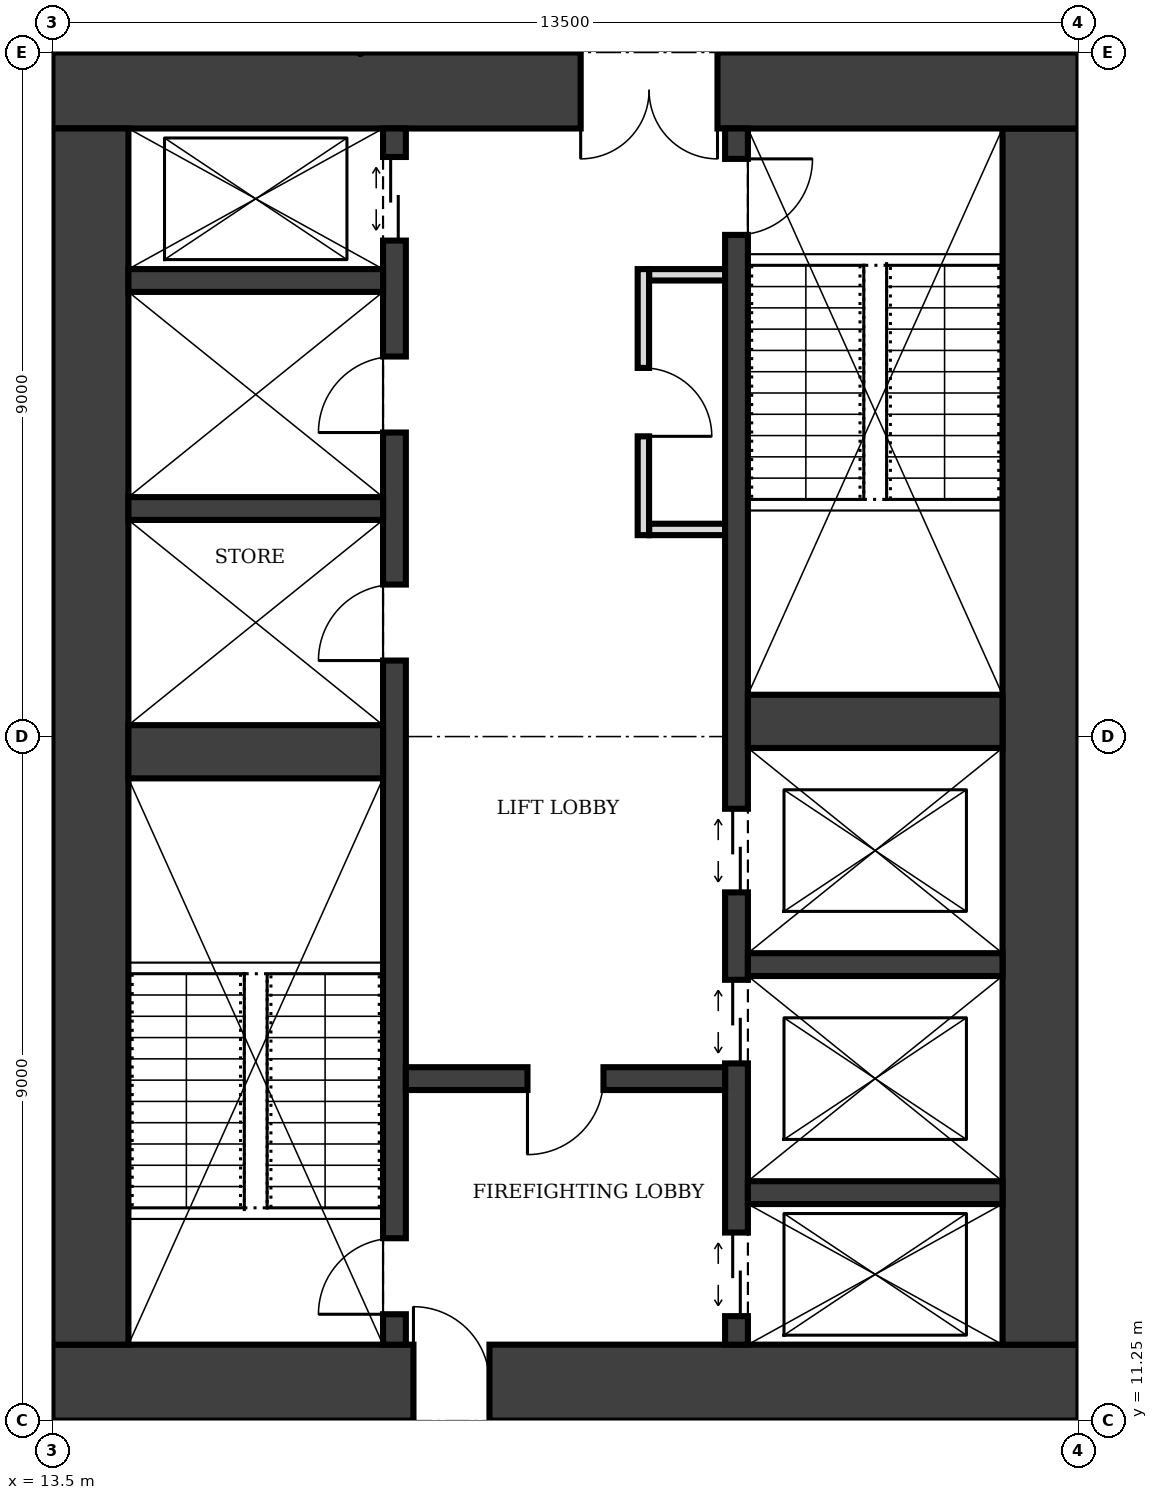
"""IFC4 building model, lengths in metres.
Left out: names, types, materials, properties, quantities, classifications, styles, units other than length and angle.
Written with IfcOpenShell. Run it as: python <this file> out.ifc"""

import sys

from ifc_helpers import new_model, si_unit, direction, frame, frame_2d, origin, place, context, subcontext, project, spatial, rectangle, extrude, element, fill, save


model = new_model("IFC4")
c1 = context("Model", 3, precision=1e-05, world=origin(), true_north=direction((0.0, 1.0)))
c2 = subcontext(c1, "Body", "Model", "MODEL_VIEW")
j1 = project(units=[si_unit("LENGTHUNIT", "METRE"), si_unit("PLANEANGLEUNIT", "RADIAN")], contexts=[c1])
p1 = place(None, origin())
s1 = spatial("IfcSite", under=j1, at=p1, CompositionType="ELEMENT")
p2 = place(p1, origin())
s2 = spatial("IfcBuilding", under=s1, at=p2, CompositionType="ELEMENT")
p3 = place(p2, frame((0.0, 0.0, 257.0)))
s3 = spatial("IfcBuildingStorey", under=s2, at=p3, CompositionType="ELEMENT", Elevation=257.0)
p4 = place(p3, frame((13.5, 11.75, 0.0), z_axis=(0.0, 0.0, 1.0), x_axis=(1.0, 0.0, 0.0)))
e1 = element("IfcWall", 1, at=p4, inside=s3, PredefinedType="SHEAR", context=c2, shape_type="SweptSolid", body=[
    extrude(rectangle(XDim=13.5, YDim=1.0, at=frame_2d((6.75, 0.0))), origin(), (0.0, 0.0, 1.0), 4.0),
])
p5 = place(p4, frame((4.75, 0.0, 0.0)))
e2 = element("IfcOpeningElement", 2, at=p5, cuts=e1, PredefinedType="OPENING", context=c2, shape_type="SweptSolid", body=[
    extrude(rectangle(XDim=1.0, YDim=2.1, at=frame_2d((0.5, 1.05))), frame((0.0, 0.51, 0.0), z_axis=(0.0, -1.0, 0.0), x_axis=(1.0, 0.0, 0.0)), (0.0, 0.0, 1.0), 1.02),
])
p6 = place(p3, frame((26.5, 12.25, 0.0), z_axis=(0.0, 0.0, 1.0), x_axis=(0.0, 1.0, 0.0)))
e3 = element("IfcWall", 3, at=p6, inside=s3, PredefinedType="SHEAR", context=c2, shape_type="SweptSolid", body=[
    extrude(rectangle(XDim=16.0, YDim=1.0, at=frame_2d((8.0, 0.0))), origin(), (0.0, 0.0, 1.0), 4.0),
])
p7 = place(p3, frame((27.0, 28.75, 0.0), z_axis=(0.0, 0.0, 1.0), x_axis=(-1.0, 0.0, 0.0)))
e4 = element("IfcWall", 4, at=p7, inside=s3, PredefinedType="SHEAR", context=c2, shape_type="SweptSolid", body=[
    extrude(rectangle(XDim=13.5, YDim=1.0, at=frame_2d((6.75, 0.0))), origin(), (0.0, 0.0, 1.0), 4.0),
])
p8 = place(p7, frame((4.75, 0.0, 0.0)))
e5 = element("IfcOpeningElement", 5, at=p8, cuts=e4, PredefinedType="OPENING", context=c2, shape_type="SweptSolid", body=[
    extrude(rectangle(XDim=1.8, YDim=2.1, at=frame_2d((0.9, 1.05))), frame((0.0, 0.51, 0.0), z_axis=(0.0, -1.0, 0.0), x_axis=(1.0, 0.0, 0.0)), (0.0, 0.0, 1.0), 1.02),
])
p9 = place(p3, frame((14.0, 28.25, 0.0), z_axis=(0.0, 0.0, 1.0), x_axis=(0.0, -1.0, 0.0)))
e6 = element("IfcWall", 6, at=p9, inside=s3, PredefinedType="SHEAR", context=c2, shape_type="SweptSolid", body=[
    extrude(rectangle(XDim=16.0, YDim=1.0, at=frame_2d((8.0, 0.0))), origin(), (0.0, 0.0, 1.0), 4.0),
])
p10 = place(p3, frame((18.0, 12.25, 0.0), z_axis=(0.0, 0.0, 1.0), x_axis=(0.0, 1.0, 0.0)))
e7 = element("IfcWall", 7, at=p10, inside=s3, PredefinedType="SHEAR", context=c2, shape_type="SweptSolid", body=[
    extrude(rectangle(XDim=16.0, YDim=0.3, at=frame_2d((8.0, 0.0))), origin(), (0.0, 0.0, 1.0), 4.0),
])
p11 = place(p10, frame((0.4, 0.0, 0.0)))
e8 = element("IfcOpeningElement", 8, at=p11, cuts=e7, PredefinedType="OPENING", context=c2, shape_type="SweptSolid", body=[
    extrude(rectangle(XDim=1.0, YDim=2.1, at=frame_2d((0.5, 1.05))), frame((0.0, 0.16, 0.0), z_axis=(0.0, -1.0, 0.0), x_axis=(1.0, 0.0, 0.0)), (0.0, 0.0, 1.0), 0.32),
])
p12 = place(p10, frame((14.525, 0.0, 0.0)))
e9 = element("IfcOpeningElement", 9, at=p12, cuts=e7, PredefinedType="OPENING", context=c2, shape_type="SweptSolid", body=[
    extrude(rectangle(XDim=1.1, YDim=2.1, at=frame_2d((0.55, 1.05))), frame((0.0, 0.16, 0.0), z_axis=(0.0, -1.0, 0.0), x_axis=(1.0, 0.0, 0.0)), (0.0, 0.0, 1.0), 0.32),
])
p13 = place(p10, frame((9.0, 0.0, 0.0)))
e10 = element("IfcOpeningElement", 10, at=p13, cuts=e7, PredefinedType="OPENING", context=c2, shape_type="SweptSolid", body=[
    extrude(rectangle(XDim=1.0, YDim=2.1, at=frame_2d((0.5, 1.05))), frame((0.0, 0.16, 0.0), z_axis=(0.0, -1.0, 0.0), x_axis=(1.0, 0.0, 0.0)), (0.0, 0.0, 1.0), 0.32),
])
p14 = place(p10, frame((12.0, 0.0, 0.0)))
e11 = element("IfcOpeningElement", 11, at=p14, cuts=e7, PredefinedType="OPENING", context=c2, shape_type="SweptSolid", body=[
    extrude(rectangle(XDim=1.0, YDim=2.1, at=frame_2d((0.5, 1.05))), frame((0.0, 0.16, 0.0), z_axis=(0.0, -1.0, 0.0), x_axis=(1.0, 0.0, 0.0)), (0.0, 0.0, 1.0), 0.32),
])
p15 = place(p3, frame((22.5, 12.25, 0.0), z_axis=(0.0, 0.0, 1.0), x_axis=(0.0, 1.0, 0.0)))
e12 = element("IfcWall", 12, at=p15, inside=s3, PredefinedType="SHEAR", context=c2, shape_type="SweptSolid", body=[
    extrude(rectangle(XDim=16.0, YDim=0.3, at=frame_2d((8.0, 0.0))), origin(), (0.0, 0.0, 1.0), 4.0),
])
p16 = place(p15, frame((14.6, 0.0, 0.0)))
e13 = element("IfcOpeningElement", 13, at=p16, cuts=e12, PredefinedType="OPENING", context=c2, shape_type="SweptSolid", body=[
    extrude(rectangle(XDim=1.0, YDim=2.1, at=frame_2d((0.5, 1.05))), frame((0.0, 0.16, 0.0), z_axis=(0.0, -1.0, 0.0), x_axis=(1.0, 0.0, 0.0)), (0.0, 0.0, 1.0), 0.32),
])
p17 = place(p15, frame((0.375, 0.0, 0.0)))
e14 = element("IfcOpeningElement", 14, at=p17, cuts=e12, PredefinedType="OPENING", context=c2, shape_type="SweptSolid", body=[
    extrude(rectangle(XDim=1.1, YDim=2.1, at=frame_2d((0.55, 1.05))), frame((0.0, 0.16, 0.0), z_axis=(0.0, -1.0, 0.0), x_axis=(1.0, 0.0, 0.0)), (0.0, 0.0, 1.0), 0.32),
])
p18 = place(p15, frame((3.7, 0.0, 0.0)))
e15 = element("IfcOpeningElement", 15, at=p18, cuts=e12, PredefinedType="OPENING", context=c2, shape_type="SweptSolid", body=[
    extrude(rectangle(XDim=1.1, YDim=2.1, at=frame_2d((0.55, 1.05))), frame((0.0, 0.16, 0.0), z_axis=(0.0, -1.0, 0.0), x_axis=(1.0, 0.0, 0.0)), (0.0, 0.0, 1.0), 0.32),
])
p19 = place(p15, frame((5.95, 0.0, 0.0)))
e16 = element("IfcOpeningElement", 16, at=p19, cuts=e12, PredefinedType="OPENING", context=c2, shape_type="SweptSolid", body=[
    extrude(rectangle(XDim=1.1, YDim=2.1, at=frame_2d((0.55, 1.05))), frame((0.0, 0.16, 0.0), z_axis=(0.0, -1.0, 0.0), x_axis=(1.0, 0.0, 0.0)), (0.0, 0.0, 1.0), 0.32),
])
p20 = place(p3, frame((14.5, 20.05, 0.0), z_axis=(0.0, 0.0, 1.0), x_axis=(1.0, 0.0, 0.0)))
e17 = element("IfcWall", 17, at=p20, inside=s3, PredefinedType="SHEAR", context=c2, shape_type="SweptSolid", body=[
    extrude(rectangle(XDim=3.35, YDim=0.7, at=frame_2d((1.675, 0.0))), origin(), (0.0, 0.0, 1.0), 4.0),
])
p21 = place(p3, frame((18.15, 15.75, 0.0), z_axis=(0.0, 0.0, 1.0), x_axis=(1.0, 0.0, 0.0)))
e18 = element("IfcWall", 18, at=p21, inside=s3, PredefinedType="SHEAR", context=c2, shape_type="SweptSolid", body=[
    extrude(rectangle(XDim=4.2, YDim=0.3, at=frame_2d((2.1, 0.0))), origin(), (0.0, 0.0, 1.0), 4.0),
])
p22 = place(p21, frame((1.6, 0.0, 0.0)))
e19 = element("IfcOpeningElement", 19, at=p22, cuts=e18, PredefinedType="OPENING", context=c2, shape_type="SweptSolid", body=[
    extrude(rectangle(XDim=1.0, YDim=2.1, at=frame_2d((0.5, 1.05))), frame((0.0, 0.16, 0.0), z_axis=(0.0, -1.0, 0.0), x_axis=(1.0, 0.0, 0.0)), (0.0, 0.0, 1.0), 0.32),
])
for number, where, z_axis, x_axis in (
    (20, (22.65, 14.25, 0.0), (0.0, 0.0, 1.0), (1.0, 0.0, 0.0)),
    (21, (22.65, 17.25, 0.0), (0.0, 0.0, 1.0), (1.0, 0.0, 0.0)),
):
    element("IfcWall", number, at=place(p3, frame(where, z_axis=z_axis, x_axis=x_axis)), inside=s3, PredefinedType="SHEAR", context=c2, shape_type="SweptSolid", body=[
        extrude(rectangle(XDim=3.35, YDim=0.3, at=frame_2d((1.675, 0.0))), origin(), (0.0, 0.0, 1.0), 4.0),
    ])
p23 = place(p3, frame((22.65, 20.45, 0.0), z_axis=(0.0, 0.0, 1.0), x_axis=(1.0, 0.0, 0.0)))
e22 = element("IfcWall", 22, at=p23, inside=s3, PredefinedType="SHEAR", context=c2, shape_type="SweptSolid", body=[
    extrude(rectangle(XDim=3.35, YDim=0.7, at=frame_2d((1.675, 0.0))), origin(), (0.0, 0.0, 1.0), 4.0),
])
for number, where, z_axis, x_axis in (
    (23, (14.5, 23.25, 0.0), (0.0, 0.0, 1.0), (1.0, 0.0, 0.0)),
    (24, (14.5, 26.25, 0.0), (0.0, 0.0, 1.0), (1.0, 0.0, 0.0)),
):
    element("IfcWall", number, at=place(p3, frame(where, z_axis=z_axis, x_axis=x_axis)), inside=s3, PredefinedType="SHEAR", context=c2, shape_type="SweptSolid", body=[
        extrude(rectangle(XDim=3.35, YDim=0.3, at=frame_2d((1.675, 0.0))), origin(), (0.0, 0.0, 1.0), 4.0),
    ])
p24 = place(p3, frame((21.275, 22.9, 0.0), z_axis=(0.0, 0.0, 1.0), x_axis=(0.0, 1.0, 0.0)))
e25 = element("IfcWall", 25, at=p24, inside=s3, PredefinedType="PARTITIONING", context=c2, shape_type="SweptSolid", body=[
    extrude(rectangle(XDim=3.5, YDim=0.15, at=frame_2d((1.75, 0.0))), origin(), (0.0, 0.0, 1.0), 3.75),
])
p25 = place(p24, frame((1.3, 0.0, 0.0)))
e26 = element("IfcOpeningElement", 26, at=p25, cuts=e25, PredefinedType="OPENING", context=c2, shape_type="SweptSolid", body=[
    extrude(rectangle(XDim=0.9, YDim=2.1, at=frame_2d((0.45, 1.05))), frame((0.0, 0.085, 0.0), z_axis=(0.0, -1.0, 0.0), x_axis=(1.0, 0.0, 0.0)), (0.0, 0.0, 1.0), 0.17),
])
for number, where, z_axis, x_axis in (
    (27, (21.35, 22.975, 0.0), (0.0, 0.0, 1.0), (1.0, 0.0, 0.0)),
    (28, (21.35, 26.325, 0.0), (0.0, 0.0, 1.0), (1.0, 0.0, 0.0)),
):
    element("IfcWall", number, at=place(p3, frame(where, z_axis=z_axis, x_axis=x_axis)), inside=s3, PredefinedType="PARTITIONING", context=c2, shape_type="SweptSolid", body=[
        extrude(rectangle(XDim=1.0, YDim=0.15, at=frame_2d((0.5, 0.0))), origin(), (0.0, 0.0, 1.0), 3.75),
    ])
p26 = place(p5, origin())
e29 = element("IfcDoor", 29, at=p26, inside=s3, OperationType="SINGLE_SWING_LEFT", PredefinedType="DOOR", context=c2, shape_type="SweptSolid", body=[
    extrude(rectangle(XDim=1.0, YDim=2.1, at=frame_2d((0.5, 1.05))), frame((0.0, 0.025, 0.0), z_axis=(0.0, -1.0, 0.0), x_axis=(1.0, 0.0, 0.0)), (0.0, 0.0, 1.0), 0.05),
])
fill(e2, e29)
p27 = place(p8, origin())
e30 = element("IfcDoor", 30, at=p27, inside=s3, OperationType="DOUBLE_DOOR_SINGLE_SWING", PredefinedType="DOOR", context=c2, shape_type="SweptSolid", body=[
    extrude(rectangle(XDim=1.8, YDim=2.1, at=frame_2d((0.9, 1.05))), frame((0.0, 0.025, 0.0), z_axis=(0.0, -1.0, 0.0), x_axis=(1.0, 0.0, 0.0)), (0.0, 0.0, 1.0), 0.05),
])
fill(e5, e30)
p28 = place(p22, frame((1.0, 0.0, 0.0), z_axis=(0.0, 0.0, 1.0), x_axis=(-1.0, 0.0, 0.0)))
e31 = element("IfcDoor", 31, at=p28, inside=s3, OperationType="SINGLE_SWING_RIGHT", PredefinedType="DOOR", context=c2, shape_type="SweptSolid", body=[
    extrude(rectangle(XDim=1.0, YDim=2.1, at=frame_2d((0.5, 1.05))), frame((0.0, 0.025, 0.0), z_axis=(0.0, -1.0, 0.0), x_axis=(1.0, 0.0, 0.0)), (0.0, 0.0, 1.0), 0.05),
])
fill(e19, e31)
p29 = place(p11, origin())
e32 = element("IfcDoor", 32, at=p29, inside=s3, OperationType="SINGLE_SWING_LEFT", PredefinedType="DOOR", context=c2, shape_type="SweptSolid", body=[
    extrude(rectangle(XDim=1.0, YDim=2.1, at=frame_2d((0.5, 1.05))), frame((0.0, 0.025, 0.0), z_axis=(0.0, -1.0, 0.0), x_axis=(1.0, 0.0, 0.0)), (0.0, 0.0, 1.0), 0.05),
])
fill(e8, e32)
p30 = place(p16, frame((1.0, 0.0, 0.0), z_axis=(0.0, 0.0, 1.0), x_axis=(-1.0, 0.0, 0.0)))
e33 = element("IfcDoor", 33, at=p30, inside=s3, OperationType="SINGLE_SWING_LEFT", PredefinedType="DOOR", context=c2, shape_type="SweptSolid", body=[
    extrude(rectangle(XDim=1.0, YDim=2.1, at=frame_2d((0.5, 1.05))), frame((0.0, 0.025, 0.0), z_axis=(0.0, -1.0, 0.0), x_axis=(1.0, 0.0, 0.0)), (0.0, 0.0, 1.0), 0.05),
])
fill(e13, e33)
p31 = place(p17, origin())
e34 = element("IfcDoor", 34, at=p31, inside=s3, OperationType="DOUBLE_DOOR_SLIDING", PredefinedType="DOOR", context=c2, shape_type="SweptSolid", body=[
    extrude(rectangle(XDim=1.1, YDim=2.1, at=frame_2d((0.55, 1.05))), frame((0.0, 0.025, 0.0), z_axis=(0.0, -1.0, 0.0), x_axis=(1.0, 0.0, 0.0)), (0.0, 0.0, 1.0), 0.05),
])
fill(e14, e34)
p32 = place(p12, origin())
e35 = element("IfcDoor", 35, at=p32, inside=s3, OperationType="DOUBLE_DOOR_SLIDING", PredefinedType="DOOR", context=c2, shape_type="SweptSolid", body=[
    extrude(rectangle(XDim=1.1, YDim=2.1, at=frame_2d((0.55, 1.05))), frame((0.0, 0.025, 0.0), z_axis=(0.0, -1.0, 0.0), x_axis=(1.0, 0.0, 0.0)), (0.0, 0.0, 1.0), 0.05),
])
fill(e9, e35)
p33 = place(p18, origin())
e36 = element("IfcDoor", 36, at=p33, inside=s3, OperationType="DOUBLE_DOOR_SLIDING", PredefinedType="DOOR", context=c2, shape_type="SweptSolid", body=[
    extrude(rectangle(XDim=1.1, YDim=2.1, at=frame_2d((0.55, 1.05))), frame((0.0, 0.025, 0.0), z_axis=(0.0, -1.0, 0.0), x_axis=(1.0, 0.0, 0.0)), (0.0, 0.0, 1.0), 0.05),
])
fill(e15, e36)
p34 = place(p19, origin())
e37 = element("IfcDoor", 37, at=p34, inside=s3, OperationType="DOUBLE_DOOR_SLIDING", PredefinedType="DOOR", context=c2, shape_type="SweptSolid", body=[
    extrude(rectangle(XDim=1.1, YDim=2.1, at=frame_2d((0.55, 1.05))), frame((0.0, 0.025, 0.0), z_axis=(0.0, -1.0, 0.0), x_axis=(1.0, 0.0, 0.0)), (0.0, 0.0, 1.0), 0.05),
])
fill(e16, e37)
p35 = place(p25, frame((0.9, 0.0, 0.0), z_axis=(0.0, 0.0, 1.0), x_axis=(-1.0, 0.0, 0.0)))
e38 = element("IfcDoor", 38, at=p35, inside=s3, OperationType="SINGLE_SWING_RIGHT", PredefinedType="DOOR", context=c2, shape_type="SweptSolid", body=[
    extrude(rectangle(XDim=0.9, YDim=2.1, at=frame_2d((0.45, 1.05))), frame((0.0, 0.025, 0.0), z_axis=(0.0, -1.0, 0.0), x_axis=(1.0, 0.0, 0.0)), (0.0, 0.0, 1.0), 0.05),
])
fill(e26, e38)
p36 = place(p13, origin())
e39 = element("IfcDoor", 39, at=p36, inside=s3, OperationType="SINGLE_SWING_LEFT", PredefinedType="DOOR", context=c2, shape_type="SweptSolid", body=[
    extrude(rectangle(XDim=1.0, YDim=2.1, at=frame_2d((0.5, 1.05))), frame((0.0, 0.025, 0.0), z_axis=(0.0, -1.0, 0.0), x_axis=(1.0, 0.0, 0.0)), (0.0, 0.0, 1.0), 0.05),
])
fill(e10, e39)
p37 = place(p14, origin())
e40 = element("IfcDoor", 40, at=p37, inside=s3, OperationType="SINGLE_SWING_LEFT", PredefinedType="DOOR", context=c2, shape_type="SweptSolid", body=[
    extrude(rectangle(XDim=1.0, YDim=2.1, at=frame_2d((0.5, 1.05))), frame((0.0, 0.025, 0.0), z_axis=(0.0, -1.0, 0.0), x_axis=(1.0, 0.0, 0.0)), (0.0, 0.0, 1.0), 0.05),
])
fill(e11, e40)
save(model, sys.argv[1])
